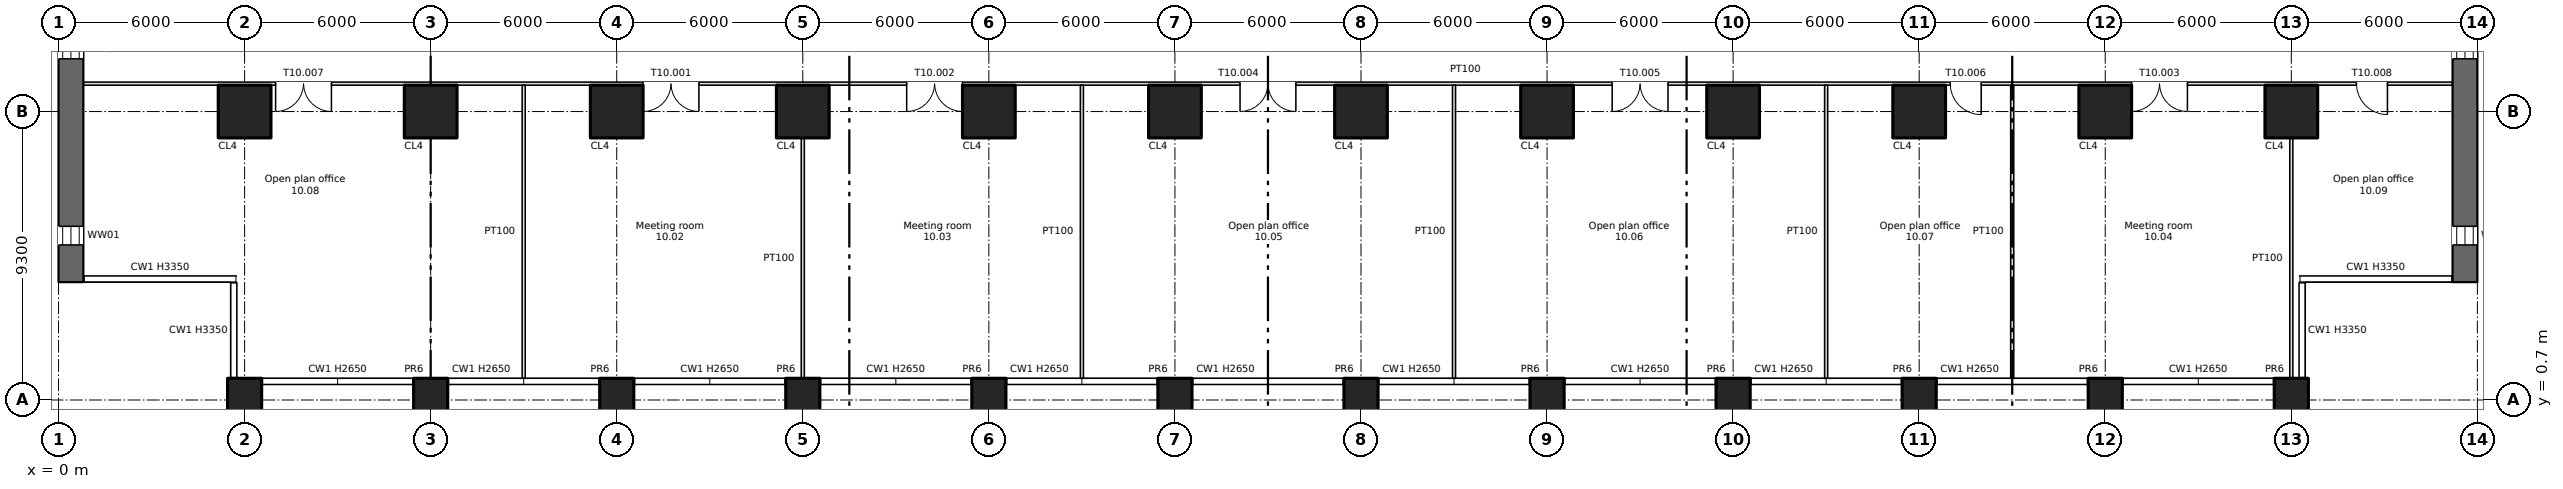
"""IFC4 building model, lengths in metres.
Left out: names, types, materials, properties, quantities, classifications, styles, units other than length and angle.
Written with IfcOpenShell. Run it as: python <this file> out.ifc"""

import sys

from ifc_helpers import new_model, si_unit, direction, frame, frame_2d, origin, origin_2d, place, context, subcontext, project, spatial, rectangle, extrude, element, fill, save


model = new_model("IFC4")
c1 = context("Model", 3, precision=1e-05, world=origin(), true_north=direction((0.0, 1.0)))
c2 = subcontext(c1, "Body", "Model", "MODEL_VIEW")
j1 = project(units=[si_unit("LENGTHUNIT", "METRE"), si_unit("PLANEANGLEUNIT", "RADIAN")], contexts=[c1])
p1 = place(None, origin())
s1 = spatial("IfcSite", under=j1, at=p1, CompositionType="ELEMENT")
p2 = place(p1, origin())
s2 = spatial("IfcBuilding", under=s1, at=p2, CompositionType="ELEMENT")
p3 = place(p2, frame((0.0, 0.0, 45.0)))
s3 = spatial("IfcBuildingStorey", under=s2, at=p3, CompositionType="ELEMENT", Elevation=45.0)
for number, where, z_axis, x_axis in (
    (1, (6.0, 0.7, -0.4), (0.0, 0.0, 1.0), (1.0, 0.0, 0.0)),
    (2, (12.0, 0.7, -0.4), (0.0, 0.0, 1.0), (1.0, 0.0, 0.0)),
    (3, (18.0, 0.7, -0.4), (0.0, 0.0, 1.0), (1.0, 0.0, 0.0)),
    (4, (24.0, 0.7, -0.4), (0.0, 0.0, 1.0), (1.0, 0.0, 0.0)),
    (5, (30.0, 0.7, -0.4), (0.0, 0.0, 1.0), (1.0, 0.0, 0.0)),
    (6, (36.0, 0.7, -0.4), (0.0, 0.0, 1.0), (1.0, 0.0, 0.0)),
    (7, (42.0, 0.7, -0.4), (0.0, 0.0, 1.0), (1.0, 0.0, 0.0)),
    (8, (48.0, 0.7, -0.4), (0.0, 0.0, 1.0), (1.0, 0.0, 0.0)),
    (9, (54.0, 0.7, -0.4), (0.0, 0.0, 1.0), (1.0, 0.0, 0.0)),
    (10, (60.0, 0.7, -0.4), (0.0, 0.0, 1.0), (1.0, 0.0, 0.0)),
    (11, (66.0, 0.7, -0.4), (0.0, 0.0, 1.0), (1.0, 0.0, 0.0)),
    (12, (72.0, 0.7, -0.4), (0.0, 0.0, 1.0), (1.0, 0.0, 0.0)),
):
    element("IfcColumn", number, at=place(p3, frame(where, z_axis=z_axis, x_axis=x_axis)), inside=s3, PredefinedType="COLUMN", context=c2, shape_type="SweptSolid", body=[
        extrude(rectangle(XDim=1.1, YDim=1.4, at=origin_2d()), origin(), (0.0, 0.0, 1.0), 3.75),
    ])
for number, where, z_axis, x_axis in (
    (13, (6.0, 10.0, 0.0), (0.0, 0.0, 1.0), (1.0, 0.0, 0.0)),
    (14, (12.0, 10.0, 0.0), (0.0, 0.0, 1.0), (1.0, 0.0, 0.0)),
    (15, (18.0, 10.0, 0.0), (0.0, 0.0, 1.0), (1.0, 0.0, 0.0)),
    (16, (24.0, 10.0, 0.0), (0.0, 0.0, 1.0), (1.0, 0.0, 0.0)),
    (17, (30.0, 10.0, 0.0), (0.0, 0.0, 1.0), (1.0, 0.0, 0.0)),
    (18, (36.0, 10.0, 0.0), (0.0, 0.0, 1.0), (1.0, 0.0, 0.0)),
    (19, (42.0, 10.0, 0.0), (0.0, 0.0, 1.0), (1.0, 0.0, 0.0)),
    (20, (48.0, 10.0, 0.0), (0.0, 0.0, 1.0), (1.0, 0.0, 0.0)),
    (21, (54.0, 10.0, 0.0), (0.0, 0.0, 1.0), (1.0, 0.0, 0.0)),
    (22, (60.0, 10.0, 0.0), (0.0, 0.0, 1.0), (1.0, 0.0, 0.0)),
    (23, (66.0, 10.0, 0.0), (0.0, 0.0, 1.0), (1.0, 0.0, 0.0)),
    (24, (72.0, 10.0, 0.0), (0.0, 0.0, 1.0), (1.0, 0.0, 0.0)),
):
    element("IfcColumn", number, at=place(p3, frame(where, z_axis=z_axis, x_axis=x_axis)), inside=s3, PredefinedType="COLUMN", context=c2, shape_type="SweptSolid", body=[
        extrude(rectangle(XDim=1.7, YDim=1.7, at=origin_2d()), origin(), (0.0, 0.0, 1.0), 3.35),
    ])
p4 = place(p3, frame((0.4, 4.5, 0.0), z_axis=(0.0, 0.0, 1.0), x_axis=(0.0, 1.0, 0.0)))
e25 = element("IfcWall", 25, at=p4, inside=s3, PredefinedType="SHEAR", context=c2, shape_type="SweptSolid", body=[
    extrude(rectangle(XDim=37.0, YDim=0.8, at=frame_2d((18.5, 0.0))), origin(), (0.0, 0.0, 1.0), 3.35),
])
p5 = place(p4, frame((1.2, 0.0, 0.6)))
e26 = element("IfcOpeningElement", 26, at=p5, cuts=e25, PredefinedType="OPENING", context=c2, shape_type="SweptSolid", body=[
    extrude(rectangle(XDim=0.6, YDim=2.4, at=frame_2d((0.3, 1.2))), frame((0.0, 0.41, 0.0), z_axis=(0.0, -1.0, 0.0), x_axis=(1.0, 0.0, 0.0)), (0.0, 0.0, 1.0), 0.82),
])
p6 = place(p4, frame((7.2, 0.0, 0.6)))
e27 = element("IfcOpeningElement", 27, at=p6, cuts=e25, PredefinedType="OPENING", context=c2, shape_type="SweptSolid", body=[
    extrude(rectangle(XDim=0.6, YDim=2.4, at=frame_2d((0.3, 1.2))), frame((0.0, 0.41, 0.0), z_axis=(0.0, -1.0, 0.0), x_axis=(1.0, 0.0, 0.0)), (0.0, 0.0, 1.0), 0.82),
])
p7 = place(p4, frame((13.2, 0.0, 0.6)))
e28 = element("IfcOpeningElement", 28, at=p7, cuts=e25, PredefinedType="OPENING", context=c2, shape_type="SweptSolid", body=[
    extrude(rectangle(XDim=0.6, YDim=2.4, at=frame_2d((0.3, 1.2))), frame((0.0, 0.41, 0.0), z_axis=(0.0, -1.0, 0.0), x_axis=(1.0, 0.0, 0.0)), (0.0, 0.0, 1.0), 0.82),
])
p8 = place(p4, frame((19.2, 0.0, 0.6)))
e29 = element("IfcOpeningElement", 29, at=p8, cuts=e25, PredefinedType="OPENING", context=c2, shape_type="SweptSolid", body=[
    extrude(rectangle(XDim=0.6, YDim=2.4, at=frame_2d((0.3, 1.2))), frame((0.0, 0.41, 0.0), z_axis=(0.0, -1.0, 0.0), x_axis=(1.0, 0.0, 0.0)), (0.0, 0.0, 1.0), 0.82),
])
p9 = place(p4, frame((25.2, 0.0, 0.6)))
e30 = element("IfcOpeningElement", 30, at=p9, cuts=e25, PredefinedType="OPENING", context=c2, shape_type="SweptSolid", body=[
    extrude(rectangle(XDim=0.6, YDim=2.4, at=frame_2d((0.3, 1.2))), frame((0.0, 0.41, 0.0), z_axis=(0.0, -1.0, 0.0), x_axis=(1.0, 0.0, 0.0)), (0.0, 0.0, 1.0), 0.82),
])
p10 = place(p4, frame((31.2, 0.0, 0.6)))
e31 = element("IfcOpeningElement", 31, at=p10, cuts=e25, PredefinedType="OPENING", context=c2, shape_type="SweptSolid", body=[
    extrude(rectangle(XDim=0.6, YDim=2.4, at=frame_2d((0.3, 1.2))), frame((0.0, 0.41, 0.0), z_axis=(0.0, -1.0, 0.0), x_axis=(1.0, 0.0, 0.0)), (0.0, 0.0, 1.0), 0.82),
])
p11 = place(p3, frame((77.6, 4.5, 0.0), z_axis=(0.0, 0.0, 1.0), x_axis=(0.0, 1.0, 0.0)))
e32 = element("IfcWall", 32, at=p11, inside=s3, PredefinedType="SHEAR", context=c2, shape_type="SweptSolid", body=[
    extrude(rectangle(XDim=37.0, YDim=0.8, at=frame_2d((18.5, 0.0))), origin(), (0.0, 0.0, 1.0), 3.35),
])
p12 = place(p11, frame((1.2, 0.0, 0.6)))
e33 = element("IfcOpeningElement", 33, at=p12, cuts=e32, PredefinedType="OPENING", context=c2, shape_type="SweptSolid", body=[
    extrude(rectangle(XDim=0.6, YDim=2.4, at=frame_2d((0.3, 1.2))), frame((0.0, 0.41, 0.0), z_axis=(0.0, -1.0, 0.0), x_axis=(1.0, 0.0, 0.0)), (0.0, 0.0, 1.0), 0.82),
])
p13 = place(p11, frame((7.2, 0.0, 0.6)))
e34 = element("IfcOpeningElement", 34, at=p13, cuts=e32, PredefinedType="OPENING", context=c2, shape_type="SweptSolid", body=[
    extrude(rectangle(XDim=0.6, YDim=2.4, at=frame_2d((0.3, 1.2))), frame((0.0, 0.41, 0.0), z_axis=(0.0, -1.0, 0.0), x_axis=(1.0, 0.0, 0.0)), (0.0, 0.0, 1.0), 0.82),
])
p14 = place(p11, frame((13.2, 0.0, 0.6)))
e35 = element("IfcOpeningElement", 35, at=p14, cuts=e32, PredefinedType="OPENING", context=c2, shape_type="SweptSolid", body=[
    extrude(rectangle(XDim=0.6, YDim=2.4, at=frame_2d((0.3, 1.2))), frame((0.0, 0.41, 0.0), z_axis=(0.0, -1.0, 0.0), x_axis=(1.0, 0.0, 0.0)), (0.0, 0.0, 1.0), 0.82),
])
p15 = place(p11, frame((19.2, 0.0, 0.6)))
e36 = element("IfcOpeningElement", 36, at=p15, cuts=e32, PredefinedType="OPENING", context=c2, shape_type="SweptSolid", body=[
    extrude(rectangle(XDim=0.6, YDim=2.4, at=frame_2d((0.3, 1.2))), frame((0.0, 0.41, 0.0), z_axis=(0.0, -1.0, 0.0), x_axis=(1.0, 0.0, 0.0)), (0.0, 0.0, 1.0), 0.82),
])
p16 = place(p11, frame((25.2, 0.0, 0.6)))
e37 = element("IfcOpeningElement", 37, at=p16, cuts=e32, PredefinedType="OPENING", context=c2, shape_type="SweptSolid", body=[
    extrude(rectangle(XDim=0.6, YDim=2.4, at=frame_2d((0.3, 1.2))), frame((0.0, 0.41, 0.0), z_axis=(0.0, -1.0, 0.0), x_axis=(1.0, 0.0, 0.0)), (0.0, 0.0, 1.0), 0.82),
])
p17 = place(p11, frame((31.2, 0.0, 0.6)))
e38 = element("IfcOpeningElement", 38, at=p17, cuts=e32, PredefinedType="OPENING", context=c2, shape_type="SweptSolid", body=[
    extrude(rectangle(XDim=0.6, YDim=2.4, at=frame_2d((0.3, 1.2))), frame((0.0, 0.41, 0.0), z_axis=(0.0, -1.0, 0.0), x_axis=(1.0, 0.0, 0.0)), (0.0, 0.0, 1.0), 0.82),
])
p18 = place(p3, frame((0.8, 10.9, 0.0), z_axis=(0.0, 0.0, 1.0), x_axis=(1.0, 0.0, 0.0)))
e39 = element("IfcWall", 39, at=p18, inside=s3, PredefinedType="PARTITIONING", context=c2, shape_type="SweptSolid", body=[
    extrude(rectangle(XDim=76.4, YDim=0.1, at=frame_2d((38.2, 0.0))), origin(), (0.0, 0.0, 1.0), 3.35),
])
p19 = place(p18, frame((18.05, 0.0, 0.0)))
e40 = element("IfcOpeningElement", 40, at=p19, cuts=e39, PredefinedType="OPENING", context=c2, shape_type="SweptSolid", body=[
    extrude(rectangle(XDim=1.8, YDim=2.1, at=frame_2d((0.9, 1.05))), frame((0.0, 0.06, 0.0), z_axis=(0.0, -1.0, 0.0), x_axis=(1.0, 0.0, 0.0)), (0.0, 0.0, 1.0), 0.12),
])
p20 = place(p18, frame((26.55, 0.0, 0.0)))
e41 = element("IfcOpeningElement", 41, at=p20, cuts=e39, PredefinedType="OPENING", context=c2, shape_type="SweptSolid", body=[
    extrude(rectangle(XDim=1.8, YDim=2.1, at=frame_2d((0.9, 1.05))), frame((0.0, 0.06, 0.0), z_axis=(0.0, -1.0, 0.0), x_axis=(1.0, 0.0, 0.0)), (0.0, 0.0, 1.0), 0.12),
])
p21 = place(p18, frame((66.05, 0.0, 0.0)))
e42 = element("IfcOpeningElement", 42, at=p21, cuts=e39, PredefinedType="OPENING", context=c2, shape_type="SweptSolid", body=[
    extrude(rectangle(XDim=1.8, YDim=2.1, at=frame_2d((0.9, 1.05))), frame((0.0, 0.06, 0.0), z_axis=(0.0, -1.0, 0.0), x_axis=(1.0, 0.0, 0.0)), (0.0, 0.0, 1.0), 0.12),
])
p22 = place(p18, frame((37.3, 0.0, 0.0)))
e43 = element("IfcOpeningElement", 43, at=p22, cuts=e39, PredefinedType="OPENING", context=c2, shape_type="SweptSolid", body=[
    extrude(rectangle(XDim=1.8, YDim=2.1, at=frame_2d((0.9, 1.05))), frame((0.0, 0.06, 0.0), z_axis=(0.0, -1.0, 0.0), x_axis=(1.0, 0.0, 0.0)), (0.0, 0.0, 1.0), 0.12),
])
p23 = place(p18, frame((49.3, 0.0, 0.0)))
e44 = element("IfcOpeningElement", 44, at=p23, cuts=e39, PredefinedType="OPENING", context=c2, shape_type="SweptSolid", body=[
    extrude(rectangle(XDim=1.8, YDim=2.1, at=frame_2d((0.9, 1.05))), frame((0.0, 0.06, 0.0), z_axis=(0.0, -1.0, 0.0), x_axis=(1.0, 0.0, 0.0)), (0.0, 0.0, 1.0), 0.12),
])
p24 = place(p18, frame((60.2, 0.0, 0.0)))
e45 = element("IfcOpeningElement", 45, at=p24, cuts=e39, PredefinedType="OPENING", context=c2, shape_type="SweptSolid", body=[
    extrude(rectangle(XDim=1.0, YDim=2.1, at=frame_2d((0.5, 1.05))), frame((0.0, 0.06, 0.0), z_axis=(0.0, -1.0, 0.0), x_axis=(1.0, 0.0, 0.0)), (0.0, 0.0, 1.0), 0.12),
])
p25 = place(p18, frame((6.2, 0.0, 0.0)))
e46 = element("IfcOpeningElement", 46, at=p25, cuts=e39, PredefinedType="OPENING", context=c2, shape_type="SweptSolid", body=[
    extrude(rectangle(XDim=1.8, YDim=2.1, at=frame_2d((0.9, 1.05))), frame((0.0, 0.06, 0.0), z_axis=(0.0, -1.0, 0.0), x_axis=(1.0, 0.0, 0.0)), (0.0, 0.0, 1.0), 0.12),
])
p26 = place(p18, frame((73.3, 0.0, 0.0)))
e47 = element("IfcOpeningElement", 47, at=p26, cuts=e39, PredefinedType="OPENING", context=c2, shape_type="SweptSolid", body=[
    extrude(rectangle(XDim=1.0, YDim=2.1, at=frame_2d((0.5, 1.05))), frame((0.0, 0.06, 0.0), z_axis=(0.0, -1.0, 0.0), x_axis=(1.0, 0.0, 0.0)), (0.0, 0.0, 1.0), 0.12),
])
p27 = place(p3, frame((15.0, 1.4, 0.0), z_axis=(0.0, 0.0, 1.0), x_axis=(0.0, 1.0, 0.0)))
e48 = element("IfcWall", 48, at=p27, inside=s3, PredefinedType="PARTITIONING", context=c2, shape_type="SweptSolid", body=[
    extrude(rectangle(XDim=9.45, YDim=0.1, at=frame_2d((4.725, 0.0))), origin(), (0.0, 0.0, 1.0), 3.35),
])
p28 = place(p3, frame((24.0, 1.4, 0.0), z_axis=(0.0, 0.0, 1.0), x_axis=(0.0, 1.0, 0.0)))
e49 = element("IfcWall", 49, at=p28, inside=s3, PredefinedType="PARTITIONING", context=c2, shape_type="SweptSolid", body=[
    extrude(rectangle(XDim=7.75, YDim=0.1, at=frame_2d((3.875, 0.0))), origin(), (0.0, 0.0, 1.0), 3.35),
])
for number, where, z_axis, x_axis in (
    (50, (33.0, 1.4, 0.0), (0.0, 0.0, 1.0), (0.0, 1.0, 0.0)),
    (51, (45.0, 1.4, 0.0), (0.0, 0.0, 1.0), (0.0, 1.0, 0.0)),
    (52, (57.0, 1.4, 0.0), (0.0, 0.0, 1.0), (0.0, 1.0, 0.0)),
    (53, (63.0, 1.4, 0.0), (0.0, 0.0, 1.0), (0.0, 1.0, 0.0)),
):
    element("IfcWall", number, at=place(p3, frame(where, z_axis=z_axis, x_axis=x_axis)), inside=s3, PredefinedType="PARTITIONING", context=c2, shape_type="SweptSolid", body=[
        extrude(rectangle(XDim=9.45, YDim=0.1, at=frame_2d((4.725, 0.0))), origin(), (0.0, 0.0, 1.0), 3.35),
    ])
p29 = place(p3, frame((72.0, 1.4, 0.0), z_axis=(0.0, 0.0, 1.0), x_axis=(0.0, 1.0, 0.0)))
e54 = element("IfcWall", 54, at=p29, inside=s3, PredefinedType="PARTITIONING", context=c2, shape_type="SweptSolid", body=[
    extrude(rectangle(XDim=7.75, YDim=0.1, at=frame_2d((3.875, 0.0))), origin(), (0.0, 0.0, 1.0), 3.35),
])
p30 = place(p5, origin())
e55 = element("IfcWindow", 55, at=p30, inside=s3, PartitioningType="SINGLE_PANEL", PredefinedType="WINDOW", context=c2, shape_type="SweptSolid", body=[
    extrude(rectangle(XDim=0.6, YDim=2.4, at=frame_2d((0.3, 1.2))), frame((0.0, 0.03, 0.0), z_axis=(0.0, -1.0, 0.0), x_axis=(1.0, 0.0, 0.0)), (0.0, 0.0, 1.0), 0.06),
])
fill(e26, e55)
p31 = place(p6, origin())
e56 = element("IfcWindow", 56, at=p31, inside=s3, PartitioningType="SINGLE_PANEL", PredefinedType="WINDOW", context=c2, shape_type="SweptSolid", body=[
    extrude(rectangle(XDim=0.6, YDim=2.4, at=frame_2d((0.3, 1.2))), frame((0.0, 0.03, 0.0), z_axis=(0.0, -1.0, 0.0), x_axis=(1.0, 0.0, 0.0)), (0.0, 0.0, 1.0), 0.06),
])
fill(e27, e56)
p32 = place(p12, origin())
e57 = element("IfcWindow", 57, at=p32, inside=s3, PartitioningType="SINGLE_PANEL", PredefinedType="WINDOW", context=c2, shape_type="SweptSolid", body=[
    extrude(rectangle(XDim=0.6, YDim=2.4, at=frame_2d((0.3, 1.2))), frame((0.0, 0.03, 0.0), z_axis=(0.0, -1.0, 0.0), x_axis=(1.0, 0.0, 0.0)), (0.0, 0.0, 1.0), 0.06),
])
fill(e33, e57)
p33 = place(p13, origin())
e58 = element("IfcWindow", 58, at=p33, inside=s3, PartitioningType="SINGLE_PANEL", PredefinedType="WINDOW", context=c2, shape_type="SweptSolid", body=[
    extrude(rectangle(XDim=0.6, YDim=2.4, at=frame_2d((0.3, 1.2))), frame((0.0, 0.03, 0.0), z_axis=(0.0, -1.0, 0.0), x_axis=(1.0, 0.0, 0.0)), (0.0, 0.0, 1.0), 0.06),
])
fill(e34, e58)
p34 = place(p19, origin())
e59 = element("IfcDoor", 59, at=p34, inside=s3, OperationType="DOUBLE_DOOR_SINGLE_SWING", PredefinedType="DOOR", context=c2, shape_type="SweptSolid", body=[
    extrude(rectangle(XDim=1.8, YDim=2.1, at=frame_2d((0.9, 1.05))), frame((0.0, 0.025, 0.0), z_axis=(0.0, -1.0, 0.0), x_axis=(1.0, 0.0, 0.0)), (0.0, 0.0, 1.0), 0.05),
])
fill(e40, e59)
p35 = place(p20, origin())
e60 = element("IfcDoor", 60, at=p35, inside=s3, OperationType="DOUBLE_DOOR_SINGLE_SWING", PredefinedType="DOOR", context=c2, shape_type="SweptSolid", body=[
    extrude(rectangle(XDim=1.8, YDim=2.1, at=frame_2d((0.9, 1.05))), frame((0.0, 0.025, 0.0), z_axis=(0.0, -1.0, 0.0), x_axis=(1.0, 0.0, 0.0)), (0.0, 0.0, 1.0), 0.05),
])
fill(e41, e60)
p36 = place(p21, origin())
e61 = element("IfcDoor", 61, at=p36, inside=s3, OperationType="DOUBLE_DOOR_SINGLE_SWING", PredefinedType="DOOR", context=c2, shape_type="SweptSolid", body=[
    extrude(rectangle(XDim=1.8, YDim=2.1, at=frame_2d((0.9, 1.05))), frame((0.0, 0.025, 0.0), z_axis=(0.0, -1.0, 0.0), x_axis=(1.0, 0.0, 0.0)), (0.0, 0.0, 1.0), 0.05),
])
fill(e42, e61)
p37 = place(p22, origin())
e62 = element("IfcDoor", 62, at=p37, inside=s3, OperationType="DOUBLE_DOOR_SINGLE_SWING", PredefinedType="DOOR", context=c2, shape_type="SweptSolid", body=[
    extrude(rectangle(XDim=1.8, YDim=2.1, at=frame_2d((0.9, 1.05))), frame((0.0, 0.025, 0.0), z_axis=(0.0, -1.0, 0.0), x_axis=(1.0, 0.0, 0.0)), (0.0, 0.0, 1.0), 0.05),
])
fill(e43, e62)
p38 = place(p23, origin())
e63 = element("IfcDoor", 63, at=p38, inside=s3, OperationType="DOUBLE_DOOR_SINGLE_SWING", PredefinedType="DOOR", context=c2, shape_type="SweptSolid", body=[
    extrude(rectangle(XDim=1.8, YDim=2.1, at=frame_2d((0.9, 1.05))), frame((0.0, 0.025, 0.0), z_axis=(0.0, -1.0, 0.0), x_axis=(1.0, 0.0, 0.0)), (0.0, 0.0, 1.0), 0.05),
])
fill(e44, e63)
p39 = place(p24, origin())
e64 = element("IfcDoor", 64, at=p39, inside=s3, OperationType="SINGLE_SWING_RIGHT", PredefinedType="DOOR", context=c2, shape_type="SweptSolid", body=[
    extrude(rectangle(XDim=1.0, YDim=2.1, at=frame_2d((0.5, 1.05))), frame((0.0, 0.025, 0.0), z_axis=(0.0, -1.0, 0.0), x_axis=(1.0, 0.0, 0.0)), (0.0, 0.0, 1.0), 0.05),
])
fill(e45, e64)
p40 = place(p25, origin())
e65 = element("IfcDoor", 65, at=p40, inside=s3, OperationType="DOUBLE_DOOR_SINGLE_SWING", PredefinedType="DOOR", context=c2, shape_type="SweptSolid", body=[
    extrude(rectangle(XDim=1.8, YDim=2.1, at=frame_2d((0.9, 1.05))), frame((0.0, 0.025, 0.0), z_axis=(0.0, -1.0, 0.0), x_axis=(1.0, 0.0, 0.0)), (0.0, 0.0, 1.0), 0.05),
])
fill(e46, e65)
p41 = place(p26, origin())
e66 = element("IfcDoor", 66, at=p41, inside=s3, OperationType="SINGLE_SWING_RIGHT", PredefinedType="DOOR", context=c2, shape_type="SweptSolid", body=[
    extrude(rectangle(XDim=1.0, YDim=2.1, at=frame_2d((0.5, 1.05))), frame((0.0, 0.025, 0.0), z_axis=(0.0, -1.0, 0.0), x_axis=(1.0, 0.0, 0.0)), (0.0, 0.0, 1.0), 0.05),
])
fill(e47, e66)
save(model, sys.argv[1])
